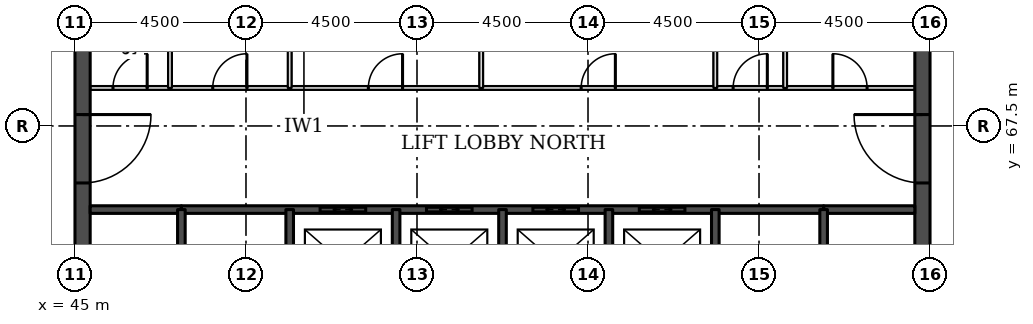
"""IFC4 building model, lengths in metres.
Left out: names, types, materials, properties, quantities, classifications, styles, units other than length and angle.
Written with IfcOpenShell. Run it as: python <this file> out.ifc"""

import sys

from ifc_helpers import new_model, si_unit, direction, frame, frame_2d, origin, place, context, subcontext, project, spatial, rectangle, extrude, element, fill, save


model = new_model("IFC4")
c1 = context("Model", 3, precision=1e-05, world=origin(), true_north=direction((0.0, 1.0)))
c2 = subcontext(c1, "Body", "Model", "MODEL_VIEW")
j1 = project(units=[si_unit("LENGTHUNIT", "METRE"), si_unit("PLANEANGLEUNIT", "RADIAN")], contexts=[c1])
p1 = place(None, origin())
s1 = spatial("IfcSite", under=j1, at=p1, CompositionType="ELEMENT")
p2 = place(p1, origin())
s2 = spatial("IfcBuilding", under=s1, at=p2, CompositionType="ELEMENT")
p3 = place(p2, frame((0.0, 0.0, 169.9)))
s3 = spatial("IfcBuildingStorey", under=s2, at=p3, CompositionType="ELEMENT", Elevation=169.9)
p4 = place(p3, frame((45.2, 49.5, 0.0), z_axis=(0.0, 0.0, 1.0), x_axis=(0.0, 1.0, 0.0)))
e1 = element("IfcWall", 1, at=p4, inside=s3, PredefinedType="SHEAR", context=c2, shape_type="SweptSolid", body=[
    extrude(rectangle(XDim=22.5, YDim=0.4, at=frame_2d((11.25, 0.0))), origin(), (0.0, 0.0, 1.0), 3.7),
])
p5 = place(p4, frame((4.2, 0.0, 0.0)))
e2 = element("IfcOpeningElement", 2, at=p5, cuts=e1, PredefinedType="OPENING", context=c2, shape_type="SweptSolid", body=[
    extrude(rectangle(XDim=1.8, YDim=2.1, at=frame_2d((0.9, 1.05))), frame((0.0, 0.21, 0.0), z_axis=(0.0, -1.0, 0.0), x_axis=(1.0, 0.0, 0.0)), (0.0, 0.0, 1.0), 0.42),
])
p6 = place(p4, frame((6.9, 0.0, 0.0)))
e3 = element("IfcOpeningElement", 3, at=p6, cuts=e1, PredefinedType="OPENING", context=c2, shape_type="SweptSolid", body=[
    extrude(rectangle(XDim=1.1, YDim=2.1, at=frame_2d((0.55, 1.05))), frame((0.0, 0.21, 0.0), z_axis=(0.0, -1.0, 0.0), x_axis=(1.0, 0.0, 0.0)), (0.0, 0.0, 1.0), 0.42),
])
p7 = place(p4, frame((13.6, 0.0, 0.0)))
e4 = element("IfcOpeningElement", 4, at=p7, cuts=e1, PredefinedType="OPENING", context=c2, shape_type="SweptSolid", body=[
    extrude(rectangle(XDim=1.1, YDim=2.1, at=frame_2d((0.55, 1.05))), frame((0.0, 0.21, 0.0), z_axis=(0.0, -1.0, 0.0), x_axis=(1.0, 0.0, 0.0)), (0.0, 0.0, 1.0), 0.42),
])
p8 = place(p4, frame((16.5, 0.0, 0.0)))
e5 = element("IfcOpeningElement", 5, at=p8, cuts=e1, PredefinedType="OPENING", context=c2, shape_type="SweptSolid", body=[
    extrude(rectangle(XDim=1.8, YDim=2.1, at=frame_2d((0.9, 1.05))), frame((0.0, 0.21, 0.0), z_axis=(0.0, -1.0, 0.0), x_axis=(1.0, 0.0, 0.0)), (0.0, 0.0, 1.0), 0.42),
])
p9 = place(p3, frame((67.3, 49.5, 0.0), z_axis=(0.0, 0.0, 1.0), x_axis=(0.0, 1.0, 0.0)))
e6 = element("IfcWall", 6, at=p9, inside=s3, PredefinedType="SHEAR", context=c2, shape_type="SweptSolid", body=[
    extrude(rectangle(XDim=22.5, YDim=0.4, at=frame_2d((11.25, 0.0))), origin(), (0.0, 0.0, 1.0), 3.7),
])
p10 = place(p9, frame((4.2, 0.0, 0.0)))
e7 = element("IfcOpeningElement", 7, at=p10, cuts=e6, PredefinedType="OPENING", context=c2, shape_type="SweptSolid", body=[
    extrude(rectangle(XDim=1.8, YDim=2.1, at=frame_2d((0.9, 1.05))), frame((0.0, 0.21, 0.0), z_axis=(0.0, -1.0, 0.0), x_axis=(1.0, 0.0, 0.0)), (0.0, 0.0, 1.0), 0.42),
])
p11 = place(p9, frame((6.9, 0.0, 0.0)))
e8 = element("IfcOpeningElement", 8, at=p11, cuts=e6, PredefinedType="OPENING", context=c2, shape_type="SweptSolid", body=[
    extrude(rectangle(XDim=1.1, YDim=2.1, at=frame_2d((0.55, 1.05))), frame((0.0, 0.21, 0.0), z_axis=(0.0, -1.0, 0.0), x_axis=(1.0, 0.0, 0.0)), (0.0, 0.0, 1.0), 0.42),
])
p12 = place(p9, frame((13.6, 0.0, 0.0)))
e9 = element("IfcOpeningElement", 9, at=p12, cuts=e6, PredefinedType="OPENING", context=c2, shape_type="SweptSolid", body=[
    extrude(rectangle(XDim=1.1, YDim=2.1, at=frame_2d((0.55, 1.05))), frame((0.0, 0.21, 0.0), z_axis=(0.0, -1.0, 0.0), x_axis=(1.0, 0.0, 0.0)), (0.0, 0.0, 1.0), 0.42),
])
p13 = place(p9, frame((16.5, 0.0, 0.0)))
e10 = element("IfcOpeningElement", 10, at=p13, cuts=e6, PredefinedType="OPENING", context=c2, shape_type="SweptSolid", body=[
    extrude(rectangle(XDim=1.8, YDim=2.1, at=frame_2d((0.9, 1.05))), frame((0.0, 0.21, 0.0), z_axis=(0.0, -1.0, 0.0), x_axis=(1.0, 0.0, 0.0)), (0.0, 0.0, 1.0), 0.42),
])
for number, where, z_axis, x_axis in (
    (11, (45.4, 65.3, 0.0), (0.0, 0.0, 1.0), (1.0, 0.0, 0.0)),
    (12, (64.7, 65.3, 0.0), (0.0, 0.0, 1.0), (1.0, 0.0, 0.0)),
):
    element("IfcWall", number, at=place(p3, frame(where, z_axis=z_axis, x_axis=x_axis)), inside=s3, PredefinedType="SOLIDWALL", context=c2, shape_type="SweptSolid", body=[
        extrude(rectangle(XDim=2.4, YDim=0.2, at=frame_2d((1.2, 0.0))), origin(), (0.0, 0.0, 1.0), 3.55),
    ])
p14 = place(p3, frame((47.8, 65.3, 0.0), z_axis=(0.0, 0.0, 1.0), x_axis=(1.0, 0.0, 0.0)))
e13 = element("IfcWall", 13, at=p14, inside=s3, PredefinedType="SOLIDWALL", context=c2, shape_type="SweptSolid", body=[
    extrude(rectangle(XDim=16.9, YDim=0.2, at=frame_2d((8.45, 0.0))), origin(), (0.0, 0.0, 1.0), 3.55),
])
p15 = place(p14, frame((3.65, 0.0, 0.0)))
e14 = element("IfcOpeningElement", 14, at=p15, cuts=e13, PredefinedType="OPENING", context=c2, shape_type="SweptSolid", body=[
    extrude(rectangle(XDim=1.2, YDim=2.1, at=frame_2d((0.6, 1.05))), frame((0.0, 0.11, 0.0), z_axis=(0.0, -1.0, 0.0), x_axis=(1.0, 0.0, 0.0)), (0.0, 0.0, 1.0), 0.22),
])
p16 = place(p14, frame((6.45, 0.0, 0.0)))
e15 = element("IfcOpeningElement", 15, at=p16, cuts=e13, PredefinedType="OPENING", context=c2, shape_type="SweptSolid", body=[
    extrude(rectangle(XDim=1.2, YDim=2.1, at=frame_2d((0.6, 1.05))), frame((0.0, 0.11, 0.0), z_axis=(0.0, -1.0, 0.0), x_axis=(1.0, 0.0, 0.0)), (0.0, 0.0, 1.0), 0.22),
])
p17 = place(p14, frame((9.25, 0.0, 0.0)))
e16 = element("IfcOpeningElement", 16, at=p17, cuts=e13, PredefinedType="OPENING", context=c2, shape_type="SweptSolid", body=[
    extrude(rectangle(XDim=1.2, YDim=2.1, at=frame_2d((0.6, 1.05))), frame((0.0, 0.11, 0.0), z_axis=(0.0, -1.0, 0.0), x_axis=(1.0, 0.0, 0.0)), (0.0, 0.0, 1.0), 0.22),
])
p18 = place(p14, frame((12.05, 0.0, 0.0)))
e17 = element("IfcOpeningElement", 17, at=p18, cuts=e13, PredefinedType="OPENING", context=c2, shape_type="SweptSolid", body=[
    extrude(rectangle(XDim=1.2, YDim=2.1, at=frame_2d((0.6, 1.05))), frame((0.0, 0.11, 0.0), z_axis=(0.0, -1.0, 0.0), x_axis=(1.0, 0.0, 0.0)), (0.0, 0.0, 1.0), 0.22),
])
p19 = place(p3, frame((45.4, 68.5, 0.0), z_axis=(0.0, 0.0, 1.0), x_axis=(1.0, 0.0, 0.0)))
e18 = element("IfcWall", 18, at=p19, inside=s3, PredefinedType="PARTITIONING", context=c2, shape_type="SweptSolid", body=[
    extrude(rectangle(XDim=21.7, YDim=0.1, at=frame_2d((10.85, 0.0))), origin(), (0.0, 0.0, 1.0), 3.55),
])
p20 = place(p19, frame((19.544, 0.0, 0.0)))
e19 = element("IfcOpeningElement", 19, at=p20, cuts=e18, PredefinedType="OPENING", context=c2, shape_type="SweptSolid", body=[
    extrude(rectangle(XDim=0.9, YDim=2.1, at=frame_2d((0.45, 1.05))), frame((0.0, 0.06, 0.0), z_axis=(0.0, -1.0, 0.0), x_axis=(1.0, 0.0, 0.0)), (0.0, 0.0, 1.0), 0.12),
])
p21 = place(p19, frame((16.919, 0.0, 0.0)))
e20 = element("IfcOpeningElement", 20, at=p21, cuts=e18, PredefinedType="OPENING", context=c2, shape_type="SweptSolid", body=[
    extrude(rectangle(XDim=0.9, YDim=2.1, at=frame_2d((0.45, 1.05))), frame((0.0, 0.06, 0.0), z_axis=(0.0, -1.0, 0.0), x_axis=(1.0, 0.0, 0.0)), (0.0, 0.0, 1.0), 0.12),
])
p22 = place(p19, frame((0.6, 0.0, 0.0)))
e21 = element("IfcOpeningElement", 21, at=p22, cuts=e18, PredefinedType="OPENING", context=c2, shape_type="SweptSolid", body=[
    extrude(rectangle(XDim=0.9, YDim=2.1, at=frame_2d((0.45, 1.05))), frame((0.0, 0.06, 0.0), z_axis=(0.0, -1.0, 0.0), x_axis=(1.0, 0.0, 0.0)), (0.0, 0.0, 1.0), 0.12),
])
p23 = place(p19, frame((3.225, 0.0, 0.0)))
e22 = element("IfcOpeningElement", 22, at=p23, cuts=e18, PredefinedType="OPENING", context=c2, shape_type="SweptSolid", body=[
    extrude(rectangle(XDim=0.9, YDim=2.1, at=frame_2d((0.45, 1.05))), frame((0.0, 0.06, 0.0), z_axis=(0.0, -1.0, 0.0), x_axis=(1.0, 0.0, 0.0)), (0.0, 0.0, 1.0), 0.12),
])
p24 = place(p19, frame((12.92, 0.0, 0.0)))
e23 = element("IfcOpeningElement", 23, at=p24, cuts=e18, PredefinedType="OPENING", context=c2, shape_type="SweptSolid", body=[
    extrude(rectangle(XDim=0.9, YDim=2.1, at=frame_2d((0.45, 1.05))), frame((0.0, 0.06, 0.0), z_axis=(0.0, -1.0, 0.0), x_axis=(1.0, 0.0, 0.0)), (0.0, 0.0, 1.0), 0.12),
])
p25 = place(p19, frame((7.32, 0.0, 0.0)))
e24 = element("IfcOpeningElement", 24, at=p25, cuts=e18, PredefinedType="OPENING", context=c2, shape_type="SweptSolid", body=[
    extrude(rectangle(XDim=0.9, YDim=2.1, at=frame_2d((0.45, 1.05))), frame((0.0, 0.06, 0.0), z_axis=(0.0, -1.0, 0.0), x_axis=(1.0, 0.0, 0.0)), (0.0, 0.0, 1.0), 0.12),
])
p26 = place(p3, frame((47.5, 68.5, 0.0), z_axis=(0.0, 0.0, 1.0), x_axis=(0.0, 1.0, 0.0)))
e25 = element("IfcWall", 25, at=p26, inside=s3, PredefinedType="PARTITIONING", context=c2, shape_type="SweptSolid", body=[
    extrude(rectangle(XDim=3.1, YDim=0.1, at=frame_2d((1.55, 0.0))), origin(), (0.0, 0.0, 1.0), 3.55),
])
p27 = place(p3, frame((47.8, 62.0, 0.0), z_axis=(0.0, 0.0, 1.0), x_axis=(0.0, 1.0, 0.0)))
e26 = element("IfcWall", 26, at=p27, inside=s3, PredefinedType="SOLIDWALL", context=c2, shape_type="SweptSolid", body=[
    extrude(rectangle(XDim=3.3, YDim=0.2, at=frame_2d((1.65, 0.0))), origin(), (0.0, 0.0, 1.0), 3.55),
])
p28 = place(p27, frame((1.1, 0.0, 0.0)))
e27 = element("IfcOpeningElement", 27, at=p28, cuts=e26, PredefinedType="OPENING", context=c2, shape_type="SweptSolid", body=[
    extrude(rectangle(XDim=1.1, YDim=2.1, at=frame_2d((0.55, 1.05))), frame((0.0, 0.11, 0.0), z_axis=(0.0, -1.0, 0.0), x_axis=(1.0, 0.0, 0.0)), (0.0, 0.0, 1.0), 0.22),
])
p29 = place(p3, frame((50.65, 68.5, 0.0), z_axis=(0.0, 0.0, 1.0), x_axis=(0.0, 1.0, 0.0)))
e28 = element("IfcWall", 28, at=p29, inside=s3, PredefinedType="PARTITIONING", context=c2, shape_type="SweptSolid", body=[
    extrude(rectangle(XDim=3.1, YDim=0.1, at=frame_2d((1.55, 0.0))), origin(), (0.0, 0.0, 1.0), 3.55),
])
p30 = place(p3, frame((50.65, 62.0, 0.0), z_axis=(0.0, 0.0, 1.0), x_axis=(0.0, 1.0, 0.0)))
e29 = element("IfcWall", 29, at=p30, inside=s3, PredefinedType="SOLIDWALL", context=c2, shape_type="SweptSolid", body=[
    extrude(rectangle(XDim=3.3, YDim=0.2, at=frame_2d((1.65, 0.0))), origin(), (0.0, 0.0, 1.0), 3.55),
])
p31 = place(p3, frame((53.45, 62.5, 0.0), z_axis=(0.0, 0.0, 1.0), x_axis=(0.0, 1.0, 0.0)))
e30 = element("IfcWall", 30, at=p31, inside=s3, PredefinedType="SOLIDWALL", context=c2, shape_type="SweptSolid", body=[
    extrude(rectangle(XDim=2.8, YDim=0.2, at=frame_2d((1.4, 0.0))), origin(), (0.0, 0.0, 1.0), 3.55),
])
p32 = place(p3, frame((55.69, 68.5, 0.0), z_axis=(0.0, 0.0, 1.0), x_axis=(0.0, 1.0, 0.0)))
e31 = element("IfcWall", 31, at=p32, inside=s3, PredefinedType="PARTITIONING", context=c2, shape_type="SweptSolid", body=[
    extrude(rectangle(XDim=3.1, YDim=0.1, at=frame_2d((1.55, 0.0))), origin(), (0.0, 0.0, 1.0), 3.55),
])
for number, where, z_axis, x_axis in (
    (32, (56.25, 62.5, 0.0), (0.0, 0.0, 1.0), (0.0, 1.0, 0.0)),
    (33, (59.05, 62.5, 0.0), (0.0, 0.0, 1.0), (0.0, 1.0, 0.0)),
):
    element("IfcWall", number, at=place(p3, frame(where, z_axis=z_axis, x_axis=x_axis)), inside=s3, PredefinedType="SOLIDWALL", context=c2, shape_type="SweptSolid", body=[
        extrude(rectangle(XDim=2.8, YDim=0.2, at=frame_2d((1.4, 0.0))), origin(), (0.0, 0.0, 1.0), 3.55),
    ])
p33 = place(p3, frame((61.85, 68.5, 0.0), z_axis=(0.0, 0.0, 1.0), x_axis=(0.0, 1.0, 0.0)))
e34 = element("IfcWall", 34, at=p33, inside=s3, PredefinedType="PARTITIONING", context=c2, shape_type="SweptSolid", body=[
    extrude(rectangle(XDim=3.1, YDim=0.1, at=frame_2d((1.55, 0.0))), origin(), (0.0, 0.0, 1.0), 3.55),
])
p34 = place(p3, frame((61.85, 62.0, 0.0), z_axis=(0.0, 0.0, 1.0), x_axis=(0.0, 1.0, 0.0)))
e35 = element("IfcWall", 35, at=p34, inside=s3, PredefinedType="SOLIDWALL", context=c2, shape_type="SweptSolid", body=[
    extrude(rectangle(XDim=3.3, YDim=0.2, at=frame_2d((1.65, 0.0))), origin(), (0.0, 0.0, 1.0), 3.55),
])
p35 = place(p3, frame((63.688, 68.5, 0.0), z_axis=(0.0, 0.0, 1.0), x_axis=(0.0, 1.0, 0.0)))
e36 = element("IfcWall", 36, at=p35, inside=s3, PredefinedType="PARTITIONING", context=c2, shape_type="SweptSolid", body=[
    extrude(rectangle(XDim=3.1, YDim=0.1, at=frame_2d((1.55, 0.0))), origin(), (0.0, 0.0, 1.0), 3.55),
])
p36 = place(p3, frame((64.7, 62.0, 0.0), z_axis=(0.0, 0.0, 1.0), x_axis=(0.0, 1.0, 0.0)))
e37 = element("IfcWall", 37, at=p36, inside=s3, PredefinedType="SOLIDWALL", context=c2, shape_type="SweptSolid", body=[
    extrude(rectangle(XDim=3.3, YDim=0.2, at=frame_2d((1.65, 0.0))), origin(), (0.0, 0.0, 1.0), 3.55),
])
p37 = place(p36, frame((1.1, 0.0, 0.0)))
e38 = element("IfcOpeningElement", 38, at=p37, cuts=e37, PredefinedType="OPENING", context=c2, shape_type="SweptSolid", body=[
    extrude(rectangle(XDim=1.1, YDim=2.1, at=frame_2d((0.55, 1.05))), frame((0.0, 0.11, 0.0), z_axis=(0.0, -1.0, 0.0), x_axis=(1.0, 0.0, 0.0)), (0.0, 0.0, 1.0), 0.22),
])
p38 = place(p15, origin())
e39 = element("IfcDoor", 39, at=p38, inside=s3, OperationType="DOUBLE_DOOR_SLIDING", PredefinedType="DOOR", context=c2, shape_type="SweptSolid", body=[
    extrude(rectangle(XDim=1.2, YDim=2.1, at=frame_2d((0.6, 1.05))), frame((0.0, 0.025, 0.0), z_axis=(0.0, -1.0, 0.0), x_axis=(1.0, 0.0, 0.0)), (0.0, 0.0, 1.0), 0.05),
])
fill(e14, e39)
p39 = place(p16, origin())
e40 = element("IfcDoor", 40, at=p39, inside=s3, OperationType="DOUBLE_DOOR_SLIDING", PredefinedType="DOOR", context=c2, shape_type="SweptSolid", body=[
    extrude(rectangle(XDim=1.2, YDim=2.1, at=frame_2d((0.6, 1.05))), frame((0.0, 0.025, 0.0), z_axis=(0.0, -1.0, 0.0), x_axis=(1.0, 0.0, 0.0)), (0.0, 0.0, 1.0), 0.05),
])
fill(e15, e40)
p40 = place(p17, origin())
e41 = element("IfcDoor", 41, at=p40, inside=s3, OperationType="DOUBLE_DOOR_SLIDING", PredefinedType="DOOR", context=c2, shape_type="SweptSolid", body=[
    extrude(rectangle(XDim=1.2, YDim=2.1, at=frame_2d((0.6, 1.05))), frame((0.0, 0.025, 0.0), z_axis=(0.0, -1.0, 0.0), x_axis=(1.0, 0.0, 0.0)), (0.0, 0.0, 1.0), 0.05),
])
fill(e16, e41)
p41 = place(p18, origin())
e42 = element("IfcDoor", 42, at=p41, inside=s3, OperationType="DOUBLE_DOOR_SLIDING", PredefinedType="DOOR", context=c2, shape_type="SweptSolid", body=[
    extrude(rectangle(XDim=1.2, YDim=2.1, at=frame_2d((0.6, 1.05))), frame((0.0, 0.025, 0.0), z_axis=(0.0, -1.0, 0.0), x_axis=(1.0, 0.0, 0.0)), (0.0, 0.0, 1.0), 0.05),
])
fill(e17, e42)
p42 = place(p8, frame((1.8, 0.0, 0.0), z_axis=(0.0, 0.0, 1.0), x_axis=(-1.0, 0.0, 0.0)))
e43 = element("IfcDoor", 43, at=p42, inside=s3, OperationType="SINGLE_SWING_LEFT", PredefinedType="DOOR", context=c2, shape_type="SweptSolid", body=[
    extrude(rectangle(XDim=1.8, YDim=2.1, at=frame_2d((0.9, 1.05))), frame((0.0, 0.025, 0.0), z_axis=(0.0, -1.0, 0.0), x_axis=(1.0, 0.0, 0.0)), (0.0, 0.0, 1.0), 0.05),
])
fill(e5, e43)
p43 = place(p13, origin())
e44 = element("IfcDoor", 44, at=p43, inside=s3, OperationType="SINGLE_SWING_RIGHT", PredefinedType="DOOR", context=c2, shape_type="SweptSolid", body=[
    extrude(rectangle(XDim=1.8, YDim=2.1, at=frame_2d((0.9, 1.05))), frame((0.0, 0.025, 0.0), z_axis=(0.0, -1.0, 0.0), x_axis=(1.0, 0.0, 0.0)), (0.0, 0.0, 1.0), 0.05),
])
fill(e10, e44)
p44 = place(p20, origin())
e45 = element("IfcDoor", 45, at=p44, inside=s3, OperationType="SINGLE_SWING_LEFT", PredefinedType="DOOR", context=c2, shape_type="SweptSolid", body=[
    extrude(rectangle(XDim=0.9, YDim=2.1, at=frame_2d((0.45, 1.05))), frame((0.0, 0.025, 0.0), z_axis=(0.0, -1.0, 0.0), x_axis=(1.0, 0.0, 0.0)), (0.0, 0.0, 1.0), 0.05),
])
fill(e19, e45)
p45 = place(p21, origin())
e46 = element("IfcDoor", 46, at=p45, inside=s3, OperationType="SINGLE_SWING_RIGHT", PredefinedType="DOOR", context=c2, shape_type="SweptSolid", body=[
    extrude(rectangle(XDim=0.9, YDim=2.1, at=frame_2d((0.45, 1.05))), frame((0.0, 0.025, 0.0), z_axis=(0.0, -1.0, 0.0), x_axis=(1.0, 0.0, 0.0)), (0.0, 0.0, 1.0), 0.05),
])
fill(e20, e46)
p46 = place(p22, origin())
e47 = element("IfcDoor", 47, at=p46, inside=s3, OperationType="SINGLE_SWING_RIGHT", PredefinedType="DOOR", context=c2, shape_type="SweptSolid", body=[
    extrude(rectangle(XDim=0.9, YDim=2.1, at=frame_2d((0.45, 1.05))), frame((0.0, 0.025, 0.0), z_axis=(0.0, -1.0, 0.0), x_axis=(1.0, 0.0, 0.0)), (0.0, 0.0, 1.0), 0.05),
])
fill(e21, e47)
p47 = place(p23, origin())
e48 = element("IfcDoor", 48, at=p47, inside=s3, OperationType="SINGLE_SWING_RIGHT", PredefinedType="DOOR", context=c2, shape_type="SweptSolid", body=[
    extrude(rectangle(XDim=0.9, YDim=2.1, at=frame_2d((0.45, 1.05))), frame((0.0, 0.025, 0.0), z_axis=(0.0, -1.0, 0.0), x_axis=(1.0, 0.0, 0.0)), (0.0, 0.0, 1.0), 0.05),
])
fill(e22, e48)
p48 = place(p24, origin())
e49 = element("IfcDoor", 49, at=p48, inside=s3, OperationType="SINGLE_SWING_RIGHT", PredefinedType="DOOR", context=c2, shape_type="SweptSolid", body=[
    extrude(rectangle(XDim=0.9, YDim=2.1, at=frame_2d((0.45, 1.05))), frame((0.0, 0.025, 0.0), z_axis=(0.0, -1.0, 0.0), x_axis=(1.0, 0.0, 0.0)), (0.0, 0.0, 1.0), 0.05),
])
fill(e23, e49)
p49 = place(p25, origin())
e50 = element("IfcDoor", 50, at=p49, inside=s3, OperationType="SINGLE_SWING_RIGHT", PredefinedType="DOOR", context=c2, shape_type="SweptSolid", body=[
    extrude(rectangle(XDim=0.9, YDim=2.1, at=frame_2d((0.45, 1.05))), frame((0.0, 0.025, 0.0), z_axis=(0.0, -1.0, 0.0), x_axis=(1.0, 0.0, 0.0)), (0.0, 0.0, 1.0), 0.05),
])
fill(e24, e50)
save(model, sys.argv[1])
